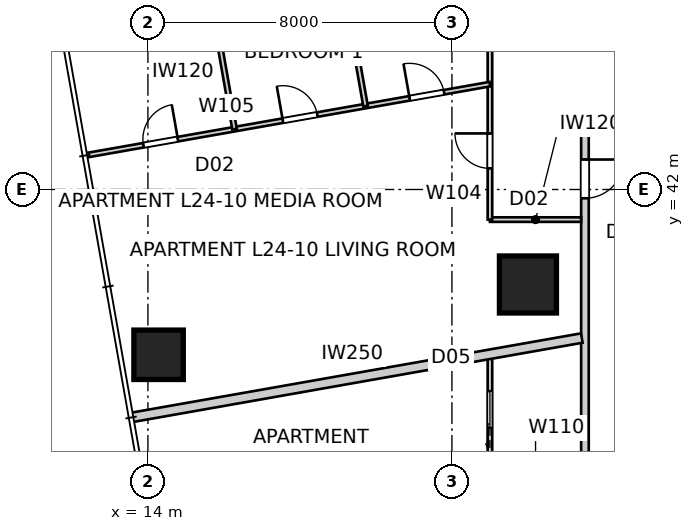
"""IFC4 building model, lengths in metres.
Left out: names, types, materials, properties, quantities, classifications, styles, units other than length and angle.
Written with IfcOpenShell. Run it as: python <this file> out.ifc"""

import sys

from ifc_helpers import new_model, si_unit, direction, frame, frame_2d, origin, origin_2d, place, context, subcontext, project, spatial, rectangle, extrude, element, fill, save


model = new_model("IFC4")
c1 = context("Model", 3, precision=1e-05, world=origin(), true_north=direction((0.0, 1.0)))
c2 = subcontext(c1, "Body", "Model", "MODEL_VIEW")
j1 = project(units=[si_unit("LENGTHUNIT", "METRE"), si_unit("PLANEANGLEUNIT", "RADIAN")], contexts=[c1])
p1 = place(None, origin())
s1 = spatial("IfcSite", under=j1, at=p1, CompositionType="ELEMENT")
p2 = place(p1, origin())
s2 = spatial("IfcBuilding", under=s1, at=p2, CompositionType="ELEMENT")
p3 = place(p2, frame((0.0, 0.0, 89.6)))
s3 = spatial("IfcBuildingStorey", under=s2, at=p3, CompositionType="ELEMENT", Elevation=89.6)
p4 = place(p3, frame((14.281, 37.65, 0.0), z_axis=(0.0, 0.0, 1.0), x_axis=(1.0, 0.0, 0.0)))
e1 = element("IfcColumn", 1, at=p4, inside=s3, PredefinedType="COLUMN", context=c2, shape_type="SweptSolid", body=[
    extrude(rectangle(XDim=1.3, YDim=1.3, at=origin_2d()), origin(), (0.0, 0.0, 1.0), 3.4),
])
p5 = place(p3, frame((24.0, 39.5, 0.0), z_axis=(0.0, 0.0, 1.0), x_axis=(1.0, 0.0, 0.0)))
e2 = element("IfcColumn", 2, at=p5, inside=s3, PredefinedType="COLUMN", context=c2, shape_type="SweptSolid", body=[
    extrude(rectangle(XDim=1.5, YDim=1.5, at=origin_2d()), origin(), (0.0, 0.0, 1.0), 3.4),
])
p6 = place(p3, frame((54.5, 43.7, 0.0), z_axis=(0.0, 0.0, 1.0), x_axis=(-1.0, 0.0, 0.0)))
e3 = element("IfcWall", 3, at=p6, inside=s3, PredefinedType="PARTITIONING", context=c2, shape_type="SweptSolid", body=[
    extrude(rectangle(XDim=29.0, YDim=0.2, at=frame_2d((14.5, 0.0))), origin(), (0.0, 0.0, 1.0), 3.25),
])
p7 = place(p6, frame((11.951, 0.0, 0.0)))
e4 = element("IfcOpeningElement", 4, at=p7, cuts=e3, PredefinedType="OPENING", context=c2, shape_type="SweptSolid", body=[
    extrude(rectangle(XDim=1.02, YDim=2.34, at=frame_2d((0.51, 1.17))), frame((0.0, 0.11, 0.0), z_axis=(0.0, -1.0, 0.0), x_axis=(1.0, 0.0, 0.0)), (0.0, 0.0, 1.0), 0.22),
])
p8 = place(p6, frame((4.795, 0.0, 0.0)))
e5 = element("IfcOpeningElement", 5, at=p8, cuts=e3, PredefinedType="OPENING", context=c2, shape_type="SweptSolid", body=[
    extrude(rectangle(XDim=1.02, YDim=2.34, at=frame_2d((0.51, 1.17))), frame((0.0, 0.11, 0.0), z_axis=(0.0, -1.0, 0.0), x_axis=(1.0, 0.0, 0.0)), (0.0, 0.0, 1.0), 0.22),
])
p9 = place(p3, frame((25.5, 43.7, 0.0), z_axis=(0.0, 0.0, 1.0), x_axis=(0.0, -1.0, 0.0)))
e6 = element("IfcWall", 6, at=p9, inside=s3, PredefinedType="PARTITIONING", context=c2, shape_type="SweptSolid", body=[
    extrude(rectangle(XDim=27.4, YDim=0.2, at=frame_2d((13.7, 0.0))), origin(), (0.0, 0.0, 1.0), 3.25),
])
p10 = place(p9, frame((24.333, 0.0, 0.0)))
e7 = element("IfcOpeningElement", 7, at=p10, cuts=e6, PredefinedType="OPENING", context=c2, shape_type="SweptSolid", body=[
    extrude(rectangle(XDim=1.02, YDim=2.1, at=frame_2d((0.51, 1.05))), frame((0.0, 0.11, 0.0), z_axis=(0.0, -1.0, 0.0), x_axis=(1.0, 0.0, 0.0)), (0.0, 0.0, 1.0), 0.22),
])
p11 = place(p9, frame((10.631, 0.0, 0.0)))
e8 = element("IfcOpeningElement", 8, at=p11, cuts=e6, PredefinedType="OPENING", context=c2, shape_type="SweptSolid", body=[
    extrude(rectangle(XDim=1.02, YDim=2.34, at=frame_2d((0.51, 1.17))), frame((0.0, 0.11, 0.0), z_axis=(0.0, -1.0, 0.0), x_axis=(1.0, 0.0, 0.0)), (0.0, 0.0, 1.0), 0.22),
])
p12 = place(p9, frame((0.911, 0.0, 0.0)))
e9 = element("IfcOpeningElement", 9, at=p12, cuts=e6, PredefinedType="OPENING", context=c2, shape_type="SweptSolid", body=[
    extrude(rectangle(XDim=1.02, YDim=2.34, at=frame_2d((0.51, 1.17))), frame((0.0, 0.11, 0.0), z_axis=(0.0, -1.0, 0.0), x_axis=(1.0, 0.0, 0.0)), (0.0, 0.0, 1.0), 0.22),
])
p13 = place(p3, frame((13.556, 35.999, 0.0), z_axis=(0.0, 0.0, 1.0), x_axis=(0.984806609184, 0.173654664517, 0.0)))
e10 = element("IfcWall", 10, at=p13, inside=s3, PredefinedType="PARTITIONING", context=c2, shape_type="SweptSolid", body=[
    extrude(rectangle(XDim=12.044, YDim=0.25, at=frame_2d((6.022, 0.0))), origin(), (0.0, 0.0, 1.0), 3.25),
])
p14 = place(p3, frame((23.0, 22.0, 0.0), z_axis=(0.0, 0.0, 1.0), x_axis=(0.0, 1.0, 0.0)))
e11 = element("IfcWall", 11, at=p14, inside=s3, PredefinedType="PARTITIONING", context=c2, shape_type="SweptSolid", body=[
    extrude(rectangle(XDim=15.664, YDim=0.12, at=frame_2d((7.832, 0.0))), origin(), (0.0, 0.0, 1.0), 2.55),
])
p15 = place(p14, frame((9.874, 0.0, 0.0)))
e12 = element("IfcOpeningElement", 12, at=p15, cuts=e11, PredefinedType="OPENING", context=c2, shape_type="SweptSolid", body=[
    extrude(rectangle(XDim=0.92, YDim=2.34, at=frame_2d((0.46, 1.17))), frame((0.0, 0.07, 0.0), z_axis=(0.0, -1.0, 0.0), x_axis=(1.0, 0.0, 0.0)), (0.0, 0.0, 1.0), 0.14),
])
p16 = place(p14, frame((13.734, 0.0, 0.0)))
e13 = element("IfcOpeningElement", 13, at=p16, cuts=e11, PredefinedType="OPENING", context=c2, shape_type="SweptSolid", body=[
    extrude(rectangle(XDim=0.96, YDim=2.1, at=frame_2d((0.48, 1.05))), frame((0.0, 0.07, 0.0), z_axis=(0.0, -1.0, 0.0), x_axis=(1.0, 0.0, 0.0)), (0.0, 0.0, 1.0), 0.14),
])
p17 = place(p14, frame((6.198, 0.0, 0.0)))
e14 = element("IfcOpeningElement", 14, at=p17, cuts=e11, PredefinedType="OPENING", context=c2, shape_type="SweptSolid", body=[
    extrude(rectangle(XDim=0.96, YDim=2.1, at=frame_2d((0.48, 1.05))), frame((0.0, 0.07, 0.0), z_axis=(0.0, -1.0, 0.0), x_axis=(1.0, 0.0, 0.0)), (0.0, 0.0, 1.0), 0.14),
])
p18 = place(p14, frame((2.231, 0.0, 0.0)))
e15 = element("IfcOpeningElement", 15, at=p18, cuts=e11, PredefinedType="OPENING", context=c2, shape_type="SweptSolid", body=[
    extrude(rectangle(XDim=0.96, YDim=2.1, at=frame_2d((0.48, 1.05))), frame((0.0, 0.07, 0.0), z_axis=(0.0, -1.0, 0.0), x_axis=(1.0, 0.0, 0.0)), (0.0, 0.0, 1.0), 0.14),
])
p19 = place(p3, frame((25.4, 41.208, 0.0), z_axis=(0.0, 0.0, 1.0), x_axis=(-1.0, 0.0, 0.0)))
e16 = element("IfcWall", 16, at=p19, inside=s3, PredefinedType="PARTITIONING", context=c2, shape_type="SweptSolid", body=[
    extrude(rectangle(XDim=2.4, YDim=0.12, at=frame_2d((1.2, 0.0))), origin(), (0.0, 0.0, 1.0), 2.638),
])
p20 = place(p3, frame((23.0, 41.208, 0.0), z_axis=(0.0, 0.0, 1.0), x_axis=(0.0, 1.0, 0.0)))
e17 = element("IfcWall", 17, at=p20, inside=s3, PredefinedType="PARTITIONING", context=c2, shape_type="SweptSolid", body=[
    extrude(rectangle(XDim=4.581, YDim=0.12, at=frame_2d((2.291, 0.0))), origin(), (0.0, 0.0, 1.0), 2.638),
])
p21 = place(p20, frame((1.348, 0.0, 0.0)))
e18 = element("IfcOpeningElement", 18, at=p21, cuts=e17, PredefinedType="OPENING", context=c2, shape_type="SweptSolid", body=[
    extrude(rectangle(XDim=0.92, YDim=2.34, at=frame_2d((0.46, 1.17))), frame((0.0, 0.07, 0.0), z_axis=(0.0, -1.0, 0.0), x_axis=(1.0, 0.0, 0.0)), (0.0, 0.0, 1.0), 0.14),
])
p22 = place(p3, frame((12.38, 42.9, 0.0), z_axis=(0.0, 0.0, 1.0), x_axis=(0.984807253583, 0.173651010046, 0.0)))
e19 = element("IfcWall", 19, at=p22, inside=s3, PredefinedType="PARTITIONING", context=c2, shape_type="SweptSolid", body=[
    extrude(rectangle(XDim=10.783, YDim=0.12, at=frame_2d((5.392, 0.0))), origin(), (0.0, 0.0, 1.0), 3.25),
])
p23 = place(p22, frame((1.525, 0.0, 0.0)))
e20 = element("IfcOpeningElement", 20, at=p23, cuts=e19, PredefinedType="OPENING", context=c2, shape_type="SweptSolid", body=[
    extrude(rectangle(XDim=0.92, YDim=2.34, at=frame_2d((0.46, 1.17))), frame((0.0, 0.07, 0.0), z_axis=(0.0, -1.0, 0.0), x_axis=(1.0, 0.0, 0.0)), (0.0, 0.0, 1.0), 0.14),
])
p24 = place(p22, frame((5.25, 0.0, 0.0)))
e21 = element("IfcOpeningElement", 21, at=p24, cuts=e19, PredefinedType="OPENING", context=c2, shape_type="SweptSolid", body=[
    extrude(rectangle(XDim=0.92, YDim=2.34, at=frame_2d((0.46, 1.17))), frame((0.0, 0.07, 0.0), z_axis=(0.0, -1.0, 0.0), x_axis=(1.0, 0.0, 0.0)), (0.0, 0.0, 1.0), 0.14),
])
p25 = place(p22, frame((8.637, 0.0, 0.0)))
e22 = element("IfcOpeningElement", 22, at=p25, cuts=e19, PredefinedType="OPENING", context=c2, shape_type="SweptSolid", body=[
    extrude(rectangle(XDim=0.92, YDim=2.34, at=frame_2d((0.46, 1.17))), frame((0.0, 0.07, 0.0), z_axis=(0.0, -1.0, 0.0), x_axis=(1.0, 0.0, 0.0)), (0.0, 0.0, 1.0), 0.14),
])
p26 = place(p3, frame((18.432, 51.542, 0.0), z_axis=(0.0, 0.0, 1.0), x_axis=(0.173647177755, -0.984807929323, 0.0)))
e23 = element("IfcWall", 23, at=p26, inside=s3, PredefinedType="PARTITIONING", context=c2, shape_type="SweptSolid", body=[
    extrude(rectangle(XDim=7.46, YDim=0.12, at=frame_2d((3.73, 0.0))), origin(), (0.0, 0.0, 1.0), 3.25),
])
p27 = place(p3, frame((16.28, 43.588, 0.0), z_axis=(0.0, 0.0, 1.0), x_axis=(-0.173660541335, 0.984805572884, 0.0)))
e24 = element("IfcWall", 24, at=p27, inside=s3, PredefinedType="PARTITIONING", context=c2, shape_type="SweptSolid", body=[
    extrude(rectangle(XDim=3.46, YDim=0.12, at=frame_2d((1.73, 0.0))), origin(), (0.0, 0.0, 1.0), 3.25),
])
p28 = place(p12, origin())
e25 = element("IfcDoor", 25, at=p28, inside=s3, OperationType="SINGLE_SWING_LEFT", PredefinedType="DOOR", context=c2, shape_type="SweptSolid", body=[
    extrude(rectangle(XDim=1.02, YDim=2.34, at=frame_2d((0.51, 1.17))), frame((0.0, 0.025, 0.0), z_axis=(0.0, -1.0, 0.0), x_axis=(1.0, 0.0, 0.0)), (0.0, 0.0, 1.0), 0.05),
])
fill(e9, e25)
p29 = place(p21, origin())
e26 = element("IfcDoor", 26, at=p29, inside=s3, OperationType="SINGLE_SWING_RIGHT", PredefinedType="DOOR", context=c2, shape_type="SweptSolid", body=[
    extrude(rectangle(XDim=0.92, YDim=2.34, at=frame_2d((0.46, 1.17))), frame((0.0, 0.025, 0.0), z_axis=(0.0, -1.0, 0.0), x_axis=(1.0, 0.0, 0.0)), (0.0, 0.0, 1.0), 0.05),
])
fill(e18, e26)
p30 = place(p16, origin())
e27 = element("IfcDoor", 27, at=p30, inside=s3, OperationType="SLIDING_TO_LEFT", PredefinedType="DOOR", context=c2, shape_type="SweptSolid", body=[
    extrude(rectangle(XDim=0.96, YDim=2.1, at=frame_2d((0.48, 1.05))), frame((0.0, 0.025, 0.0), z_axis=(0.0, -1.0, 0.0), x_axis=(1.0, 0.0, 0.0)), (0.0, 0.0, 1.0), 0.05),
])
fill(e13, e27)
p31 = place(p23, origin())
e28 = element("IfcDoor", 28, at=p31, inside=s3, OperationType="SINGLE_SWING_RIGHT", PredefinedType="DOOR", context=c2, shape_type="SweptSolid", body=[
    extrude(rectangle(XDim=0.92, YDim=2.34, at=frame_2d((0.46, 1.17))), frame((0.0, 0.025, 0.0), z_axis=(0.0, -1.0, 0.0), x_axis=(1.0, 0.0, 0.0)), (0.0, 0.0, 1.0), 0.05),
])
fill(e20, e28)
p32 = place(p24, origin())
e29 = element("IfcDoor", 29, at=p32, inside=s3, OperationType="SINGLE_SWING_LEFT", PredefinedType="DOOR", context=c2, shape_type="SweptSolid", body=[
    extrude(rectangle(XDim=0.92, YDim=2.34, at=frame_2d((0.46, 1.17))), frame((0.0, 0.025, 0.0), z_axis=(0.0, -1.0, 0.0), x_axis=(1.0, 0.0, 0.0)), (0.0, 0.0, 1.0), 0.05),
])
fill(e21, e29)
p33 = place(p25, origin())
e30 = element("IfcDoor", 30, at=p33, inside=s3, OperationType="SINGLE_SWING_LEFT", PredefinedType="DOOR", context=c2, shape_type="SweptSolid", body=[
    extrude(rectangle(XDim=0.92, YDim=2.34, at=frame_2d((0.46, 1.17))), frame((0.0, 0.025, 0.0), z_axis=(0.0, -1.0, 0.0), x_axis=(1.0, 0.0, 0.0)), (0.0, 0.0, 1.0), 0.05),
])
fill(e22, e30)
save(model, sys.argv[1])
